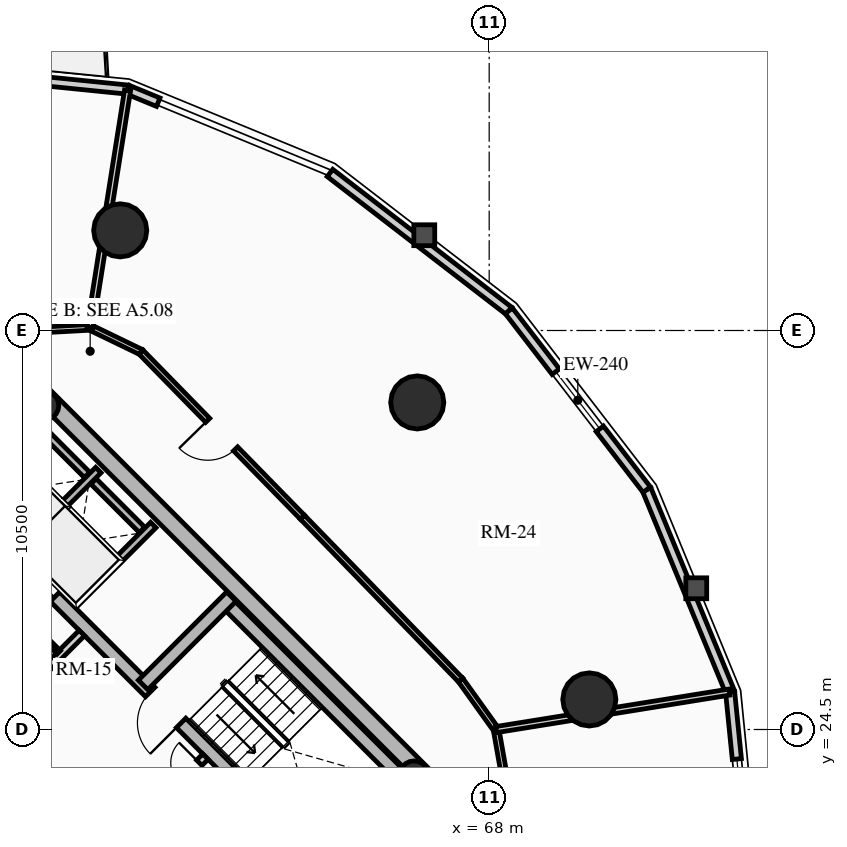
"""IFC4 building model, lengths in metres.
Left out: names, types, materials, properties, quantities, classifications, styles, units other than length and angle.
Written with IfcOpenShell. Run it as: python <this file> out.ifc"""

import sys

from ifc_helpers import new_model, si_unit, direction, frame, frame_2d, origin, origin_2d, place, context, subcontext, project, spatial, rectangle, circle, hollow_circle, extrude, source, transform, mapped, element, fill, save


model = new_model("IFC4")
c1 = context("Model", 3, precision=1e-05, world=origin(), true_north=direction((0.0, 1.0)))
c2 = subcontext(c1, "Body", "Model", "MODEL_VIEW")
j1 = project(units=[si_unit("LENGTHUNIT", "METRE"), si_unit("PLANEANGLEUNIT", "RADIAN")], contexts=[c1])
p1 = place(None, origin())
s1 = spatial("IfcSite", under=j1, at=p1, CompositionType="ELEMENT")
p2 = place(p1, origin())
s2 = spatial("IfcBuilding", under=s1, at=p2, CompositionType="ELEMENT")
p3 = place(p2, frame((0.0, 0.0, 70.15)))
s3 = spatial("IfcBuildingStorey", under=s2, at=p3, CompositionType="ELEMENT", Elevation=70.15)
for number, where, z_axis, x_axis in (
    (1, (58.737, 15.697, 0.0), (0.0, 0.0, 1.0), (-0.707, 0.707, 0.0)),
    (2, (66.303, 23.263, 0.0), (0.0, 0.0, 1.0), (-0.707, 0.707, 0.0)),
):
    element("IfcWall", number, at=place(p3, frame(where, z_axis=z_axis, x_axis=x_axis)), inside=s3, PredefinedType="SHEAR", context=c2, shape_type="SweptSolid", body=[
        extrude(rectangle(XDim=14.2, YDim=0.45, at=frame_2d((7.1, 0.0))), origin(), (0.0, 0.0, 1.0), 2.91),
    ])
p4 = place(p3, frame((58.578, 15.856, 0.0), z_axis=(0.0, 0.0, 1.0), x_axis=(0.707106781187, 0.707106781187, 0.0)))
e3 = element("IfcWall", 3, at=p4, inside=s3, PredefinedType="SHEAR", context=c2, shape_type="SweptSolid", body=[
    extrude(rectangle(XDim=10.7, YDim=0.45, at=frame_2d((5.35, 0.0))), origin(), (0.0, 0.0, 1.0), 2.91),
])
m1 = source(origin(), c2, "Body", "SweptSolid", [
    extrude(rectangle(XDim=1.5, YDim=2.02, at=frame_2d((0.75, 1.01))), frame((0.0, 0.235, 0.0), z_axis=(0.0, -1.0, 0.0), x_axis=(1.0, 0.0, 0.0)), (0.0, 0.0, 1.0), 0.47),
])
p5 = place(p4, frame((5.45, 0.0, 0.0)))
e4 = element("IfcOpeningElement", 4, at=p5, cuts=e3, PredefinedType="OPENING", context=c2, shape_type="MappedRepresentation", body=[
    mapped(m1, transform((0.0, 0.0, 0.0), x_axis=(1.0, 0.0, 0.0), y_axis=(0.0, 1.0, 0.0), z_axis=(0.0, 0.0, 1.0), scale=1.0)),
])
p6 = place(p3, frame((48.856, 25.578, 0.0), z_axis=(0.0, 0.0, 1.0), x_axis=(0.707106781187, 0.707106781187, 0.0)))
e5 = element("IfcWall", 5, at=p6, inside=s3, PredefinedType="SHEAR", context=c2, shape_type="SweptSolid", body=[
    extrude(rectangle(XDim=10.7, YDim=0.45, at=frame_2d((5.35, 0.0))), origin(), (0.0, 0.0, 1.0), 2.91),
])
p7 = place(p6, frame((4.6, 0.0, 0.0)))
e6 = element("IfcOpeningElement", 6, at=p7, cuts=e5, PredefinedType="OPENING", context=c2, shape_type="MappedRepresentation", body=[
    mapped(m1, transform((0.0, 0.0, 0.0), x_axis=(1.0, 0.0, 0.0), y_axis=(0.0, 1.0, 0.0), z_axis=(0.0, 0.0, 1.0), scale=1.0)),
])
p8 = place(p3, frame((61.078, 18.355, 0.0), z_axis=(0.0, 0.0, 1.0), x_axis=(-0.707106781187, 0.707106781187, 0.0)))
e7 = element("IfcWall", 7, at=p8, inside=s3, PredefinedType="SHEAR", context=c2, shape_type="SweptSolid", body=[
    extrude(rectangle(XDim=13.75, YDim=0.35, at=frame_2d((6.875, 0.0))), origin(), (0.0, 0.0, 1.0), 2.91),
])
m2 = source(origin(), c2, "Body", "SweptSolid", [
    extrude(rectangle(XDim=1.1, YDim=2.015, at=frame_2d((0.55, 1.007))), frame((0.0, 0.185, 0.0), z_axis=(0.0, -1.0, 0.0), x_axis=(1.0, 0.0, 0.0)), (0.0, 0.0, 1.0), 0.37),
])
p9 = place(p8, frame((4.875, 0.0, 0.0)))
e8 = element("IfcOpeningElement", 8, at=p9, cuts=e7, PredefinedType="OPENING", context=c2, shape_type="MappedRepresentation", body=[
    mapped(m2, transform((0.0, 0.0, 0.0), x_axis=(1.0, 0.0, 0.0), y_axis=(0.0, 1.0, 0.0), z_axis=(0.0, 0.0, 1.0), scale=1.0)),
])
m3 = source(origin(), c2, "Body", "SweptSolid", [
    extrude(rectangle(XDim=1.15, YDim=2.02, at=frame_2d((0.575, 1.01))), frame((0.0, 0.185, 0.0), z_axis=(0.0, -1.0, 0.0), x_axis=(1.0, 0.0, 0.0)), (0.0, 0.0, 1.0), 0.37),
])
p10 = place(p8, frame((7.295, 0.0, 0.0)))
e9 = element("IfcOpeningElement", 9, at=p10, cuts=e7, PredefinedType="OPENING", context=c2, shape_type="MappedRepresentation", body=[
    mapped(m3, transform((0.0, 0.0, 0.0), x_axis=(1.0, 0.0, 0.0), y_axis=(0.0, 1.0, 0.0), z_axis=(0.0, 0.0, 1.0), scale=1.0)),
])
p11 = place(p3, frame((63.645, 20.922, 0.0), z_axis=(0.0, 0.0, 1.0), x_axis=(-0.707106781187, 0.707106781187, 0.0)))
e10 = element("IfcWall", 10, at=p11, inside=s3, PredefinedType="SHEAR", context=c2, shape_type="SweptSolid", body=[
    extrude(rectangle(XDim=13.75, YDim=0.35, at=frame_2d((6.875, 0.0))), origin(), (0.0, 0.0, 1.0), 2.91),
])
p12 = place(p11, frame((10.0, 0.0, 0.0)))
e11 = element("IfcOpeningElement", 11, at=p12, cuts=e10, PredefinedType="OPENING", context=c2, shape_type="MappedRepresentation", body=[
    mapped(m2, transform((0.0, 0.0, 0.0), x_axis=(1.0, 0.0, 0.0), y_axis=(0.0, 1.0, 0.0), z_axis=(0.0, 0.0, 1.0), scale=1.0)),
])
p13 = place(p11, frame((12.0, 0.0, 0.0)))
e12 = element("IfcOpeningElement", 12, at=p13, cuts=e10, PredefinedType="OPENING", context=c2, shape_type="MappedRepresentation", body=[
    mapped(m2, transform((0.0, 0.0, 0.0), x_axis=(1.0, 0.0, 0.0), y_axis=(0.0, 1.0, 0.0), z_axis=(0.0, 0.0, 1.0), scale=1.0)),
])
p14 = place(p11, frame((5.305, 0.0, 0.0)))
e13 = element("IfcOpeningElement", 13, at=p14, cuts=e10, PredefinedType="OPENING", context=c2, shape_type="MappedRepresentation", body=[
    mapped(m3, transform((0.0, 0.0, 0.0), x_axis=(1.0, 0.0, 0.0), y_axis=(0.0, 1.0, 0.0), z_axis=(0.0, 0.0, 1.0), scale=1.0)),
])
p15 = place(p3, frame((65.83, 23.107, 0.0), z_axis=(0.0, 0.0, 1.0), x_axis=(-0.707088616009, 0.707124945897, 0.0)))
e14 = element("IfcWall", 14, at=p15, inside=s3, PredefinedType="SHEAR", context=c2, shape_type="SweptSolid", body=[
    extrude(rectangle(XDim=6.72, YDim=0.35, at=frame_2d((3.36, 0.0))), origin(), (0.0, 0.0, 1.0), 2.91),
])
p16 = place(p3, frame((58.893, 25.674, 0.0), z_axis=(0.0, 0.0, 1.0), x_axis=(0.707106781187, 0.707106781187, 0.0)))
e15 = element("IfcWall", 15, at=p16, inside=s3, PredefinedType="SHEAR", context=c2, shape_type="SweptSolid", body=[
    extrude(rectangle(XDim=3.285, YDim=0.35, at=frame_2d((1.643, 0.0))), origin(), (0.0, 0.0, 1.0), 2.91),
])
for number, where, z_axis, x_axis in (
    (16, (66.024, 23.294, 0.0), (0.0, 0.0, 1.0), (0.707, 0.707, 0.0)),
    (17, (56.294, 33.024, 0.0), (0.0, 0.0, 1.0), (0.707, 0.707, 0.0)),
):
    element("IfcColumn", number, at=place(p3, frame(where, z_axis=z_axis, x_axis=x_axis)), inside=s3, PredefinedType="COLUMN", context=c2, shape_type="SweptSolid", body=[
        extrude(hollow_circle(Radius=0.38, WallThickness=0.032, at=origin_2d()), origin(), (0.0, 0.0, 1.0), 2.91),
    ])
for number, where, z_axis, x_axis in (
    (18, (66.107, 33.107, 0.0), (0.0, 0.0, 1.0), (1.0, 0.0, 0.0)),
    (19, (58.291, 37.635, 0.0), (0.0, 0.0, 1.0), (1.0, 0.0, 0.0)),
    (20, (70.635, 25.291, 0.0), (0.0, 0.0, 1.0), (1.0, 0.0, 0.0)),
):
    element("IfcColumn", number, at=place(p3, frame(where, z_axis=z_axis, x_axis=x_axis)), inside=s3, PredefinedType="USERDEFINED", context=c2, shape_type="SweptSolid", body=[
        extrude(circle(Radius=0.7, at=origin_2d()), origin(), (0.0, 0.0, 1.0), 2.91),
    ])
p17 = place(p3, frame((63.811, 39.145, 0.0), z_axis=(0.0, 0.0, 1.0), x_axis=(0.791982052206, -0.61054437102, 0.0)))
e21 = element("IfcWall", 21, at=p17, inside=s3, PredefinedType="SOLIDWALL", context=c2, shape_type="SweptSolid", body=[
    extrude(rectangle(XDim=5.942, YDim=0.24, at=frame_2d((2.971, 0.0))), origin(), (0.0, 0.0, 1.0), 2.179),
])
p18 = place(p3, frame((58.487, 41.339, 0.0), z_axis=(0.0, 0.0, 1.0), x_axis=(0.924556017656, -0.381046152345, 0.0)))
e22 = element("IfcWall", 22, at=p18, inside=s3, PredefinedType="SOLIDWALL", context=c2, shape_type="SweptSolid", body=[
    extrude(rectangle(XDim=0.87, YDim=0.24, at=frame_2d((0.435, 0.0))), origin(), (0.0, 0.0, 1.0), 2.179),
])
p19 = place(p3, frame((53.067, 41.885, 0.0), z_axis=(0.0, 0.0, 1.0), x_axis=(0.994971754311, -0.10015591906, 0.0)))
e23 = element("IfcWall", 23, at=p19, inside=s3, PredefinedType="SOLIDWALL", context=c2, shape_type="SweptSolid", body=[
    extrude(rectangle(XDim=5.448, YDim=0.24, at=frame_2d((2.724, 0.0))), origin(), (0.0, 0.0, 1.0), 2.179),
])
m4 = source(origin(), c2, "Body", "SweptSolid", [
    extrude(rectangle(XDim=1.15, YDim=2.005, at=frame_2d((0.575, 1.002))), frame((0.0, 0.13, 0.0), z_axis=(0.0, -1.0, 0.0), x_axis=(1.0, 0.0, 0.0)), (0.0, 0.0, 1.0), 0.26),
])
p20 = place(p19, frame((2.149, 0.0, 0.0)))
e24 = element("IfcOpeningElement", 24, at=p20, cuts=e23, PredefinedType="OPENING", context=c2, shape_type="MappedRepresentation", body=[
    mapped(m4, transform((0.0, 0.0, 0.0), x_axis=(1.0, 0.0, 0.0), y_axis=(0.0, 1.0, 0.0), z_axis=(0.0, 0.0, 1.0), scale=1.0)),
])
p21 = place(p3, frame((74.339, 25.487, 0.0), z_axis=(0.0, 0.0, 1.0), x_axis=(0.10015591906, -0.994971754311, 0.0)))
e25 = element("IfcWall", 25, at=p21, inside=s3, PredefinedType="SOLIDWALL", context=c2, shape_type="SweptSolid", body=[
    extrude(rectangle(XDim=5.448, YDim=0.24, at=frame_2d((2.724, 0.0))), origin(), (0.0, 0.0, 1.0), 2.179),
])
m5 = source(origin(), c2, "Body", "SweptSolid", [
    extrude(rectangle(XDim=1.9, YDim=1.35, at=frame_2d((0.95, 0.675))), frame((0.0, 0.13, 0.0), z_axis=(0.0, -1.0, 0.0), x_axis=(1.0, 0.0, 0.0)), (0.0, 0.0, 1.0), 0.26),
])
p22 = place(p21, frame((1.774, 0.0, 0.65)))
e26 = element("IfcOpeningElement", 26, at=p22, cuts=e25, PredefinedType="OPENING", context=c2, shape_type="MappedRepresentation", body=[
    mapped(m5, transform((0.0, 0.0, 0.0), x_axis=(1.0, 0.0, 0.0), y_axis=(0.0, 1.0, 0.0), z_axis=(0.0, 0.0, 1.0), scale=1.0)),
])
p23 = place(p3, frame((72.145, 30.811, 0.0), z_axis=(0.0, 0.0, 1.0), x_axis=(0.381027003055, -0.924563909604, 0.0)))
e27 = element("IfcWall", 27, at=p23, inside=s3, PredefinedType="SOLIDWALL", context=c2, shape_type="SweptSolid", body=[
    extrude(rectangle(XDim=5.758, YDim=0.24, at=frame_2d((2.879, 0.0))), origin(), (0.0, 0.0, 1.0), 2.179),
])
p24 = place(p3, frame((68.517, 35.517, 0.0), z_axis=(0.0, 0.0, 1.0), x_axis=(0.61054437102, -0.791982052206, 0.0)))
e28 = element("IfcWall", 28, at=p24, inside=s3, PredefinedType="SOLIDWALL", context=c2, shape_type="SweptSolid", body=[
    extrude(rectangle(XDim=5.942, YDim=0.24, at=frame_2d((2.971, 0.0))), origin(), (0.0, 0.0, 1.0), 2.179),
])
p25 = place(p24, frame((2.021, 0.0, 0.65)))
e29 = element("IfcOpeningElement", 29, at=p25, cuts=e28, PredefinedType="OPENING", context=c2, shape_type="MappedRepresentation", body=[
    mapped(m5, transform((0.0, 0.0, 0.0), x_axis=(1.0, 0.0, 0.0), y_axis=(0.0, 1.0, 0.0), z_axis=(0.0, 0.0, 1.0), scale=1.0)),
])
p26 = place(p3, frame((57.062, 27.781, 0.0), z_axis=(0.0, 0.0, 1.0), x_axis=(0.707106781187, 0.707106781187, 0.0)))
e30 = element("IfcWall", 30, at=p26, inside=s3, PredefinedType="SHEAR", context=c2, shape_type="SweptSolid", body=[
    extrude(rectangle(XDim=2.97, YDim=0.2, at=frame_2d((1.485, 0.0))), origin(), (0.0, 0.0, 1.0), 2.91),
])
p27 = place(p3, frame((55.615, 29.227, 0.0), z_axis=(0.0, 0.0, 1.0), x_axis=(0.707147878904, 0.70706568108, 0.0)))
e31 = element("IfcWall", 31, at=p27, inside=s3, PredefinedType="SHEAR", context=c2, shape_type="SweptSolid", body=[
    extrude(rectangle(XDim=2.97, YDim=0.2, at=frame_2d((1.485, 0.0))), origin(), (0.0, 0.0, 1.0), 2.91),
])
p28 = place(p3, frame((58.865, 29.754, 0.0), z_axis=(0.0, 0.0, 1.0), x_axis=(-0.707174411312, 0.707039144592, 0.0)))
e32 = element("IfcWall", 32, at=p28, inside=s3, PredefinedType="SHEAR", context=c2, shape_type="SweptSolid", body=[
    extrude(rectangle(XDim=1.805, YDim=0.2, at=frame_2d((0.902, 0.0))), origin(), (0.0, 0.0, 1.0), 2.91),
])
p29 = place(p3, frame((57.419, 31.2, 0.0), z_axis=(0.0, 0.0, 1.0), x_axis=(-0.707032117043, 0.707181437447, 0.0)))
e33 = element("IfcWall", 33, at=p29, inside=s3, PredefinedType="SHEAR", context=c2, shape_type="SweptSolid", body=[
    extrude(rectangle(XDim=1.635, YDim=0.2, at=frame_2d((0.817, 0.0))), origin(), (0.0, 0.0, 1.0), 2.91),
])
p30 = place(p3, frame((58.214, 21.467, 0.0), z_axis=(0.0, 0.0, 1.0), x_axis=(0.707106781187, 0.707106781187, 0.0)))
e34 = element("IfcWall", 34, at=p30, inside=s3, PredefinedType="PARTITIONING", context=c2, shape_type="SweptSolid", body=[
    extrude(rectangle(XDim=3.28, YDim=0.2, at=frame_2d((1.64, 0.0))), origin(), (0.0, 0.0, 1.0), 2.655),
])
m6 = source(origin(), c2, "Body", "SweptSolid", [
    extrude(rectangle(XDim=1.5, YDim=2.02, at=frame_2d((0.75, 1.01))), frame((0.0, 0.11, 0.0), z_axis=(0.0, -1.0, 0.0), x_axis=(1.0, 0.0, 0.0)), (0.0, 0.0, 1.0), 0.22),
])
p31 = place(p30, frame((1.55, 0.0, 0.0)))
e35 = element("IfcOpeningElement", 35, at=p31, cuts=e34, PredefinedType="OPENING", context=c2, shape_type="MappedRepresentation", body=[
    mapped(m6, transform((0.0, 0.0, 0.0), x_axis=(1.0, 0.0, 0.0), y_axis=(0.0, 1.0, 0.0), z_axis=(0.0, 0.0, 1.0), scale=1.0)),
])
p32 = place(p3, frame((54.961, 24.719, 0.0), z_axis=(0.0, 0.0, 1.0), x_axis=(0.707106781187, 0.707106781187, 0.0)))
e36 = element("IfcWall", 36, at=p32, inside=s3, PredefinedType="PARTITIONING", context=c2, shape_type="SweptSolid", body=[
    extrude(rectangle(XDim=3.28, YDim=0.2, at=frame_2d((1.64, 0.0))), origin(), (0.0, 0.0, 1.0), 2.655),
])
m7 = source(origin(), c2, "Body", "SweptSolid", [
    extrude(rectangle(XDim=0.9, YDim=2.005, at=frame_2d((0.45, 1.002))), frame((0.0, 0.11, 0.0), z_axis=(0.0, -1.0, 0.0), x_axis=(1.0, 0.0, 0.0)), (0.0, 0.0, 1.0), 0.22),
])
p33 = place(p32, frame((0.16, 0.0, 0.0)))
e37 = element("IfcOpeningElement", 37, at=p33, cuts=e36, PredefinedType="OPENING", context=c2, shape_type="MappedRepresentation", body=[
    mapped(m7, transform((0.0, 0.0, 0.0), x_axis=(1.0, 0.0, 0.0), y_axis=(0.0, 1.0, 0.0), z_axis=(0.0, 0.0, 1.0), scale=1.0)),
])
p34 = place(p3, frame((56.673, 26.529, 0.0), z_axis=(0.0, 0.0, 1.0), x_axis=(-0.707052764397, 0.70716079385, 0.0)))
e38 = element("IfcWall", 38, at=p34, inside=s3, PredefinedType="PARTITIONING", context=c2, shape_type="SweptSolid", body=[
    extrude(rectangle(XDim=2.26, YDim=0.125, at=frame_2d((1.13, 0.0))), origin(), (0.0, 0.0, 1.0), 2.655),
])
m8 = source(origin(), c2, "Body", "SweptSolid", [
    extrude(rectangle(XDim=0.9, YDim=2.005, at=frame_2d((0.45, 1.002))), frame((0.0, 0.073, 0.0), z_axis=(0.0, -1.0, 0.0), x_axis=(1.0, 0.0, 0.0)), (0.0, 0.0, 1.0), 0.145),
])
p35 = place(p34, frame((0.65, 0.0, 0.0)))
e39 = element("IfcOpeningElement", 39, at=p35, cuts=e38, PredefinedType="OPENING", context=c2, shape_type="MappedRepresentation", body=[
    mapped(m8, transform((0.0, 0.0, 0.0), x_axis=(1.0, 0.0, 0.0), y_axis=(0.0, 1.0, 0.0), z_axis=(0.0, 0.0, 1.0), scale=1.0)),
])
p36 = place(p3, frame((63.086, 30.086, 0.0), z_axis=(0.0, 0.0, 1.0), x_axis=(-0.699032802832, 0.715089603172, 0.0)))
e40 = element("IfcWall", 40, at=p36, inside=s3, PredefinedType="PARTITIONING", context=c2, shape_type="SweptSolid", body=[
    extrude(rectangle(XDim=6.082, YDim=0.15, at=frame_2d((3.041, 0.0))), origin(), (0.0, 0.0, 1.0), 2.225),
])
m9 = source(origin(), c2, "Body", "SweptSolid", [
    extrude(rectangle(XDim=1.05, YDim=2.015, at=frame_2d((0.525, 1.007))), frame((0.0, 0.085, 0.0), z_axis=(0.0, -1.0, 0.0), x_axis=(1.0, 0.0, 0.0)), (0.0, 0.0, 1.0), 0.17),
])
p37 = place(p36, frame((2.516, 0.0, 0.0)))
e41 = element("IfcOpeningElement", 41, at=p37, cuts=e40, PredefinedType="OPENING", context=c2, shape_type="MappedRepresentation", body=[
    mapped(m9, transform((0.0, 0.0, 0.0), x_axis=(1.0, 0.0, 0.0), y_axis=(0.0, 1.0, 0.0), z_axis=(0.0, 0.0, 1.0), scale=1.0)),
])
p38 = place(p3, frame((58.835, 34.435, 0.0), z_axis=(0.0, 0.0, 1.0), x_axis=(-0.900352167336, 0.4351620098, 0.0)))
e42 = element("IfcWall", 42, at=p38, inside=s3, PredefinedType="PARTITIONING", context=c2, shape_type="SweptSolid", body=[
    extrude(rectangle(XDim=1.488, YDim=0.15, at=frame_2d((0.744, 0.0))), origin(), (0.0, 0.0, 1.0), 2.225),
])
p39 = place(p3, frame((57.495, 35.083, 0.0), z_axis=(0.0, 0.0, 1.0), x_axis=(-0.998536503254, -0.054081897798, 0.0)))
e43 = element("IfcWall", 43, at=p39, inside=s3, PredefinedType="PARTITIONING", context=c2, shape_type="SweptSolid", body=[
    extrude(rectangle(XDim=1.481, YDim=0.15, at=frame_2d((0.74, 0.0))), origin(), (0.0, 0.0, 1.0), 2.225),
])
p40 = place(p3, frame((68.423, 23.142, 0.0), z_axis=(0.0, 0.0, 1.0), x_axis=(-0.174796562349, 0.984604571283, 0.0)))
e44 = element("IfcWall", 44, at=p40, inside=s3, PredefinedType="PARTITIONING", context=c2, shape_type="SweptSolid", body=[
    extrude(rectangle(XDim=1.377, YDim=0.15, at=frame_2d((0.688, 0.0))), origin(), (0.0, 0.0, 1.0), 2.225),
])
p41 = place(p3, frame((68.182, 24.498, 0.0), z_axis=(0.0, 0.0, 1.0), x_axis=(-0.582532339525, 0.812807525437, 0.0)))
e45 = element("IfcWall", 45, at=p41, inside=s3, PredefinedType="PARTITIONING", context=c2, shape_type="SweptSolid", body=[
    extrude(rectangle(XDim=1.605, YDim=0.15, at=frame_2d((0.803, 0.0))), origin(), (0.0, 0.0, 1.0), 2.225),
])
p42 = place(p3, frame((67.247, 25.802, 0.0), z_axis=(0.0, 0.0, 1.0), x_axis=(-0.696771261687, 0.71729339108, 0.0)))
e46 = element("IfcWall", 46, at=p42, inside=s3, PredefinedType="PARTITIONING", context=c2, shape_type="SweptSolid", body=[
    extrude(rectangle(XDim=5.972, YDim=0.15, at=frame_2d((2.986, 0.0))), origin(), (0.0, 0.0, 1.0), 2.655),
])
p43 = place(p3, frame((57.495, 35.083, 0.0), z_axis=(0.0, 0.0, 1.0), x_axis=(0.156619688156, 0.987658986332, 0.0)))
e47 = element("IfcWall", 47, at=p43, inside=s3, PredefinedType="PARTITIONING", context=c2, shape_type="SweptSolid", body=[
    extrude(rectangle(XDim=6.315, YDim=0.16, at=frame_2d((3.157, 0.0))), origin(), (0.0, 0.0, 1.0), 2.179),
])
p44 = place(p3, frame((68.182, 24.498, 0.0), z_axis=(0.0, 0.0, 1.0), x_axis=(0.987330591038, 0.158676727973, 0.0)))
e48 = element("IfcWall", 48, at=p44, inside=s3, PredefinedType="PARTITIONING", context=c2, shape_type="SweptSolid", body=[
    extrude(rectangle(XDim=6.216, YDim=0.16, at=frame_2d((3.108, 0.0))), origin(), (0.0, 0.0, 1.0), 2.179),
])
m10 = source(origin(), c2, "Body", "SweptSolid", [
    extrude(rectangle(XDim=1.9, YDim=1.35, at=frame_2d((0.95, 0.675))), frame((0.0, 0.03, 0.0), z_axis=(0.0, -1.0, 0.0), x_axis=(1.0, 0.0, 0.0)), (0.0, 0.0, 1.0), 0.06),
])
p45 = place(p22, origin())
e49 = element("IfcWindow", 49, at=p45, inside=s3, PartitioningType="DOUBLE_PANEL_VERTICAL", PredefinedType="WINDOW", context=c2, shape_type="MappedRepresentation", body=[
    mapped(m10, transform((0.0, 0.0, 0.0), x_axis=(1.0, 0.0, 0.0), y_axis=(0.0, 1.0, 0.0), z_axis=(0.0, 0.0, 1.0), scale=1.0)),
])
fill(e26, e49)
p46 = place(p25, origin())
e50 = element("IfcWindow", 50, at=p46, inside=s3, PartitioningType="DOUBLE_PANEL_VERTICAL", PredefinedType="WINDOW", context=c2, shape_type="MappedRepresentation", body=[
    mapped(m10, transform((0.0, 0.0, 0.0), x_axis=(1.0, 0.0, 0.0), y_axis=(0.0, 1.0, 0.0), z_axis=(0.0, 0.0, 1.0), scale=1.0)),
])
fill(e29, e50)
m11 = source(origin(), c2, "Body", "SweptSolid", [
    extrude(rectangle(XDim=1.1, YDim=2.015, at=frame_2d((0.55, 1.007))), frame((0.0, 0.025, 0.0), z_axis=(0.0, -1.0, 0.0), x_axis=(1.0, 0.0, 0.0)), (0.0, 0.0, 1.0), 0.05),
])
p47 = place(p12, origin())
e51 = element("IfcDoor", 51, at=p47, inside=s3, OperationType="SLIDING_TO_LEFT", PredefinedType="DOOR", context=c2, shape_type="MappedRepresentation", body=[
    mapped(m11, transform((0.0, 0.0, 0.0), x_axis=(1.0, 0.0, 0.0), y_axis=(0.0, 1.0, 0.0), z_axis=(0.0, 0.0, 1.0), scale=1.0)),
])
fill(e11, e51)
m12 = source(origin(), c2, "Body", "SweptSolid", [
    extrude(rectangle(XDim=1.15, YDim=2.02, at=frame_2d((0.575, 1.01))), frame((0.0, 0.025, 0.0), z_axis=(0.0, -1.0, 0.0), x_axis=(1.0, 0.0, 0.0)), (0.0, 0.0, 1.0), 0.05),
])
p48 = place(p14, origin())
e52 = element("IfcDoor", 52, at=p48, inside=s3, OperationType="SINGLE_SWING_LEFT", PredefinedType="DOOR", context=c2, shape_type="MappedRepresentation", body=[
    mapped(m12, transform((0.0, 0.0, 0.0), x_axis=(1.0, 0.0, 0.0), y_axis=(0.0, 1.0, 0.0), z_axis=(0.0, 0.0, 1.0), scale=1.0)),
])
fill(e13, e52)
m13 = source(origin(), c2, "Body", "SweptSolid", [
    extrude(rectangle(XDim=1.5, YDim=2.02, at=frame_2d((0.75, 1.01))), frame((0.0, 0.025, 0.0), z_axis=(0.0, -1.0, 0.0), x_axis=(1.0, 0.0, 0.0)), (0.0, 0.0, 1.0), 0.05),
])
p49 = place(p31, origin())
e53 = element("IfcDoor", 53, at=p49, inside=s3, OperationType="DOUBLE_DOOR_SINGLE_SWING", PredefinedType="DOOR", context=c2, shape_type="MappedRepresentation", body=[
    mapped(m13, transform((0.0, 0.0, 0.0), x_axis=(1.0, 0.0, 0.0), y_axis=(0.0, 1.0, 0.0), z_axis=(0.0, 0.0, 1.0), scale=1.0)),
])
fill(e35, e53)
m14 = source(origin(), c2, "Body", "SweptSolid", [
    extrude(rectangle(XDim=1.05, YDim=2.015, at=frame_2d((0.525, 1.007))), frame((0.0, 0.025, 0.0), z_axis=(0.0, -1.0, 0.0), x_axis=(1.0, 0.0, 0.0)), (0.0, 0.0, 1.0), 0.05),
])
p50 = place(p37, origin())
e54 = element("IfcDoor", 54, at=p50, inside=s3, OperationType="SINGLE_SWING_RIGHT", PredefinedType="DOOR", context=c2, shape_type="MappedRepresentation", body=[
    mapped(m14, transform((0.0, 0.0, 0.0), x_axis=(1.0, 0.0, 0.0), y_axis=(0.0, 1.0, 0.0), z_axis=(0.0, 0.0, 1.0), scale=1.0)),
])
fill(e41, e54)
save(model, sys.argv[1])
